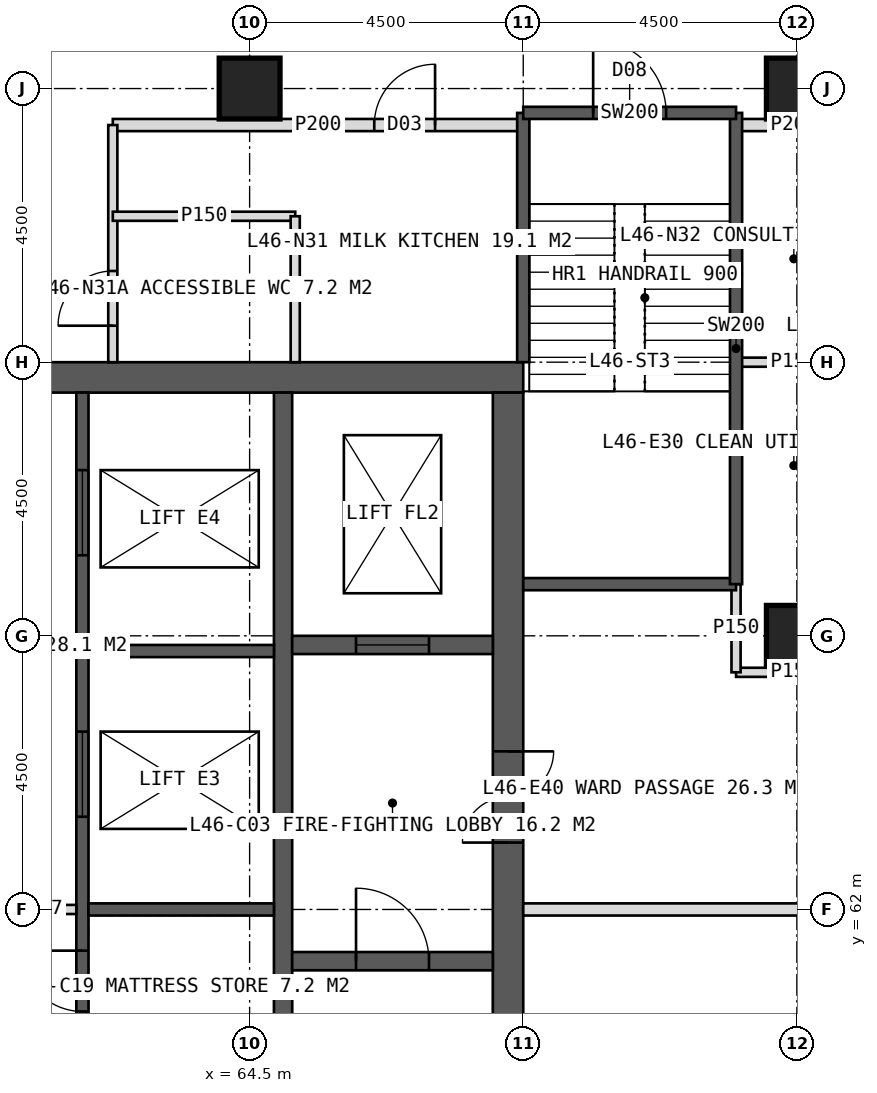
"""IFC4 building model, lengths in metres.
Left out: names, types, materials, properties, quantities, classifications, styles, units other than length and angle.
Written with IfcOpenShell. Run it as: python <this file> out.ifc"""

import sys

from ifc_helpers import new_model, si_unit, direction, frame, frame_2d, origin, origin_2d, place, context, subcontext, project, spatial, rectangle, hollow_rectangle, extrude, element, fill, save


model = new_model("IFC4")
c1 = context("Model", 3, precision=1e-05, world=origin(), true_north=direction((0.0, 1.0)))
c2 = subcontext(c1, "Body", "Model", "MODEL_VIEW")
j1 = project(units=[si_unit("LENGTHUNIT", "METRE"), si_unit("PLANEANGLEUNIT", "RADIAN")], contexts=[c1])
p1 = place(None, origin())
s1 = spatial("IfcSite", under=j1, at=p1, CompositionType="ELEMENT")
p2 = place(p1, origin())
s2 = spatial("IfcBuilding", under=s1, at=p2, CompositionType="ELEMENT")
p3 = place(p2, frame((0.0, 0.0, 193.0)))
s3 = spatial("IfcBuildingStorey", under=s2, at=p3, CompositionType="ELEMENT", Elevation=193.0)
p4 = place(p3, frame((51.0, 70.75, 0.0), z_axis=(0.0, 0.0, 1.0), x_axis=(1.0, 0.0, 0.0)))
e1 = element("IfcWall", 1, at=p4, inside=s3, PredefinedType="SHEAR", context=c2, shape_type="SweptSolid", body=[
    extrude(rectangle(XDim=18.0, YDim=0.5, at=frame_2d((9.0, 0.0))), origin(), (0.0, 0.0, 1.0), 4.0),
])
p5 = place(p4, frame((8.1, 0.0, 0.0)))
e2 = element("IfcOpeningElement", 2, at=p5, cuts=e1, PredefinedType="OPENING", context=c2, shape_type="SweptSolid", body=[
    extrude(rectangle(XDim=1.8, YDim=2.2, at=frame_2d((0.9, 1.1))), frame((0.0, 0.26, 0.0), z_axis=(0.0, -1.0, 0.0), x_axis=(1.0, 0.0, 0.0)), (0.0, 0.0, 1.0), 0.52),
])
p6 = place(p3, frame((68.75, 53.5, 0.0), z_axis=(0.0, 0.0, 1.0), x_axis=(0.0, 1.0, 0.0)))
e3 = element("IfcWall", 3, at=p6, inside=s3, PredefinedType="SHEAR", context=c2, shape_type="SweptSolid", body=[
    extrude(rectangle(XDim=17.0, YDim=0.5, at=frame_2d((8.5, 0.0))), origin(), (0.0, 0.0, 1.0), 4.0),
])
p7 = place(p6, frame((9.6, 0.0, 0.0)))
e4 = element("IfcOpeningElement", 4, at=p7, cuts=e3, PredefinedType="OPENING", context=c2, shape_type="SweptSolid", body=[
    extrude(rectangle(XDim=1.5, YDim=2.2, at=frame_2d((0.75, 1.1))), frame((0.0, 0.26, 0.0), z_axis=(0.0, -1.0, 0.0), x_axis=(1.0, 0.0, 0.0)), (0.0, 0.0, 1.0), 0.52),
])
p8 = place(p3, frame((65.05, 53.5, 0.0), z_axis=(0.0, 0.0, 1.0), x_axis=(0.0, 1.0, 0.0)))
e5 = element("IfcWall", 5, at=p8, inside=s3, PredefinedType="SHEAR", context=c2, shape_type="SweptSolid", body=[
    extrude(rectangle(XDim=17.0, YDim=0.3, at=frame_2d((8.5, 0.0))), origin(), (0.0, 0.0, 1.0), 4.0),
])
p9 = place(p3, frame((61.75, 53.5, 0.0), z_axis=(0.0, 0.0, 1.0), x_axis=(0.0, 1.0, 0.0)))
e6 = element("IfcWall", 6, at=p9, inside=s3, PredefinedType="SHEAR", context=c2, shape_type="SweptSolid", body=[
    extrude(rectangle(XDim=17.0, YDim=0.2, at=frame_2d((8.5, 0.0))), origin(), (0.0, 0.0, 1.0), 4.0),
])
p10 = place(p9, frame((0.808, 0.0, 0.0)))
e7 = element("IfcOpeningElement", 7, at=p10, cuts=e6, PredefinedType="OPENING", context=c2, shape_type="SweptSolid", body=[
    extrude(rectangle(XDim=1.0, YDim=2.1, at=frame_2d((0.5, 1.05))), frame((0.0, 0.11, 0.0), z_axis=(0.0, -1.0, 0.0), x_axis=(1.0, 0.0, 0.0)), (0.0, 0.0, 1.0), 0.22),
])
p11 = place(p9, frame((2.958, 0.0, 0.0)))
e8 = element("IfcOpeningElement", 8, at=p11, cuts=e6, PredefinedType="OPENING", context=c2, shape_type="SweptSolid", body=[
    extrude(rectangle(XDim=1.0, YDim=2.1, at=frame_2d((0.5, 1.05))), frame((0.0, 0.11, 0.0), z_axis=(0.0, -1.0, 0.0), x_axis=(1.0, 0.0, 0.0)), (0.0, 0.0, 1.0), 0.22),
])
p12 = place(p9, frame((4.722, 0.0, 0.0)))
e9 = element("IfcOpeningElement", 9, at=p12, cuts=e6, PredefinedType="OPENING", context=c2, shape_type="SweptSolid", body=[
    extrude(rectangle(XDim=1.0, YDim=2.1, at=frame_2d((0.5, 1.05))), frame((0.0, 0.11, 0.0), z_axis=(0.0, -1.0, 0.0), x_axis=(1.0, 0.0, 0.0)), (0.0, 0.0, 1.0), 0.22),
])
p13 = place(p9, frame((6.823, 0.0, 0.0)))
e10 = element("IfcOpeningElement", 10, at=p13, cuts=e6, PredefinedType="OPENING", context=c2, shape_type="SweptSolid", body=[
    extrude(rectangle(XDim=1.0, YDim=2.1, at=frame_2d((0.5, 1.05))), frame((0.0, 0.11, 0.0), z_axis=(0.0, -1.0, 0.0), x_axis=(1.0, 0.0, 0.0)), (0.0, 0.0, 1.0), 0.22),
])
p14 = place(p9, frame((10.025, 0.0, 0.0)))
e11 = element("IfcOpeningElement", 11, at=p14, cuts=e6, PredefinedType="OPENING", context=c2, shape_type="SweptSolid", body=[
    extrude(rectangle(XDim=1.4, YDim=2.2, at=frame_2d((0.7, 1.1))), frame((0.0, 0.11, 0.0), z_axis=(0.0, -1.0, 0.0), x_axis=(1.0, 0.0, 0.0)), (0.0, 0.0, 1.0), 0.22),
])
p15 = place(p9, frame((14.325, 0.0, 0.0)))
e12 = element("IfcOpeningElement", 12, at=p15, cuts=e6, PredefinedType="OPENING", context=c2, shape_type="SweptSolid", body=[
    extrude(rectangle(XDim=1.4, YDim=2.2, at=frame_2d((0.7, 1.1))), frame((0.0, 0.11, 0.0), z_axis=(0.0, -1.0, 0.0), x_axis=(1.0, 0.0, 0.0)), (0.0, 0.0, 1.0), 0.22),
])
for number, where, z_axis, x_axis in (
    (13, (61.85, 62.0, 0.0), (0.0, 0.0, 1.0), (1.0, 0.0, 0.0)),
    (14, (61.85, 66.25, 0.0), (0.0, 0.0, 1.0), (1.0, 0.0, 0.0)),
):
    element("IfcWall", number, at=place(p3, frame(where, z_axis=z_axis, x_axis=x_axis)), inside=s3, PredefinedType="SHEAR", context=c2, shape_type="SweptSolid", body=[
        extrude(rectangle(XDim=3.05, YDim=0.2, at=frame_2d((1.525, 0.0))), origin(), (0.0, 0.0, 1.0), 4.0),
    ])
p16 = place(p3, frame((65.2, 61.15, 0.0), z_axis=(0.0, 0.0, 1.0), x_axis=(1.0, 0.0, 0.0)))
e15 = element("IfcWall", 15, at=p16, inside=s3, PredefinedType="SHEAR", context=c2, shape_type="SweptSolid", body=[
    extrude(rectangle(XDim=3.3, YDim=0.3, at=frame_2d((1.65, 0.0))), origin(), (0.0, 0.0, 1.0), 4.0),
])
p17 = place(p16, frame((1.05, 0.0, 0.0)))
e16 = element("IfcOpeningElement", 16, at=p17, cuts=e15, PredefinedType="OPENING", context=c2, shape_type="SweptSolid", body=[
    extrude(rectangle(XDim=1.2, YDim=2.1, at=frame_2d((0.6, 1.05))), frame((0.0, 0.16, 0.0), z_axis=(0.0, -1.0, 0.0), x_axis=(1.0, 0.0, 0.0)), (0.0, 0.0, 1.0), 0.32),
])
p18 = place(p3, frame((65.2, 66.35, 0.0), z_axis=(0.0, 0.0, 1.0), x_axis=(1.0, 0.0, 0.0)))
e17 = element("IfcWall", 17, at=p18, inside=s3, PredefinedType="SHEAR", context=c2, shape_type="SweptSolid", body=[
    extrude(rectangle(XDim=3.3, YDim=0.3, at=frame_2d((1.65, 0.0))), origin(), (0.0, 0.0, 1.0), 4.0),
])
p19 = place(p18, frame((1.05, 0.0, 0.0)))
e18 = element("IfcOpeningElement", 18, at=p19, cuts=e17, PredefinedType="OPENING", context=c2, shape_type="SweptSolid", body=[
    extrude(rectangle(XDim=1.2, YDim=2.2, at=frame_2d((0.6, 1.1))), frame((0.0, 0.16, 0.0), z_axis=(0.0, -1.0, 0.0), x_axis=(1.0, 0.0, 0.0)), (0.0, 0.0, 1.0), 0.32),
])
for number, where, z_axis, x_axis in (
    (19, (73.5, 75.5, 0.0), (0.0, 0.0, 1.0), (1.0, 0.0, 0.0)),
    (20, (64.5, 75.5, 0.0), (0.0, 0.0, 1.0), (1.0, 0.0, 0.0)),
    (21, (73.5, 66.5, 0.0), (0.0, 0.0, 1.0), (1.0, 0.0, 0.0)),
):
    element("IfcColumn", number, at=place(p3, frame(where, z_axis=z_axis, x_axis=x_axis)), inside=s3, PredefinedType="COLUMN", context=c2, shape_type="SweptSolid", body=[
        extrude(hollow_rectangle(XDim=1.0, YDim=1.0, WallThickness=0.1, at=origin_2d()), origin(), (0.0, 0.0, 1.0), 4.0),
    ])
p20 = place(p3, frame((62.25, 74.9, 0.0), z_axis=(0.0, 0.0, 1.0), x_axis=(1.0, 0.0, 0.0)))
e22 = element("IfcWall", 22, at=p20, inside=s3, PredefinedType="PARTITIONING", context=c2, shape_type="SweptSolid", body=[
    extrude(rectangle(XDim=6.75, YDim=0.2, at=frame_2d((3.375, 0.0))), origin(), (0.0, 0.0, 1.0), 3.75),
])
p21 = place(p20, frame((4.3, 0.0, 0.0)))
e23 = element("IfcOpeningElement", 23, at=p21, cuts=e22, PredefinedType="OPENING", context=c2, shape_type="SweptSolid", body=[
    extrude(rectangle(XDim=1.0, YDim=2.1, at=frame_2d((0.5, 1.05))), frame((0.0, 0.11, 0.0), z_axis=(0.0, -1.0, 0.0), x_axis=(1.0, 0.0, 0.0)), (0.0, 0.0, 1.0), 0.22),
])
p22 = place(p3, frame((72.5, 74.9, 0.0), z_axis=(0.0, 0.0, 1.0), x_axis=(1.0, 0.0, 0.0)))
e24 = element("IfcWall", 24, at=p22, inside=s3, PredefinedType="PARTITIONING", context=c2, shape_type="SweptSolid", body=[
    extrude(rectangle(XDim=1.9, YDim=0.2, at=frame_2d((0.95, 0.0))), origin(), (0.0, 0.0, 1.0), 3.75),
])
p23 = place(p3, frame((62.25, 71.0, 0.0), z_axis=(0.0, 0.0, 1.0), x_axis=(0.0, 1.0, 0.0)))
e25 = element("IfcWall", 25, at=p23, inside=s3, PredefinedType="PARTITIONING", context=c2, shape_type="SweptSolid", body=[
    extrude(rectangle(XDim=3.9, YDim=0.15, at=frame_2d((1.95, 0.0))), origin(), (0.0, 0.0, 1.0), 3.75),
])
p24 = place(p23, frame((0.6, 0.0, 0.0)))
e26 = element("IfcOpeningElement", 26, at=p24, cuts=e25, PredefinedType="OPENING", context=c2, shape_type="SweptSolid", body=[
    extrude(rectangle(XDim=0.9, YDim=2.1, at=frame_2d((0.45, 1.05))), frame((0.0, 0.085, 0.0), z_axis=(0.0, -1.0, 0.0), x_axis=(1.0, 0.0, 0.0)), (0.0, 0.0, 1.0), 0.17),
])
p25 = place(p3, frame((62.25, 73.4, 0.0), z_axis=(0.0, 0.0, 1.0), x_axis=(1.0, 0.0, 0.0)))
e27 = element("IfcWall", 27, at=p25, inside=s3, PredefinedType="PARTITIONING", context=c2, shape_type="SweptSolid", body=[
    extrude(rectangle(XDim=3.0, YDim=0.15, at=frame_2d((1.5, 0.0))), origin(), (0.0, 0.0, 1.0), 3.75),
])
p26 = place(p3, frame((65.25, 71.0, 0.0), z_axis=(0.0, 0.0, 1.0), x_axis=(0.0, 1.0, 0.0)))
e28 = element("IfcWall", 28, at=p26, inside=s3, PredefinedType="PARTITIONING", context=c2, shape_type="SweptSolid", body=[
    extrude(rectangle(XDim=2.4, YDim=0.15, at=frame_2d((1.2, 0.0))), origin(), (0.0, 0.0, 1.0), 3.75),
])
for number, where, z_axis, x_axis in (
    (29, (72.5, 71.0, 0.0), (0.0, 0.0, 1.0), (1.0, 0.0, 0.0)),
    (30, (72.5, 65.9, 0.0), (0.0, 0.0, 1.0), (1.0, 0.0, 0.0)),
):
    element("IfcWall", number, at=place(p3, frame(where, z_axis=z_axis, x_axis=x_axis)), inside=s3, PredefinedType="PARTITIONING", context=c2, shape_type="SweptSolid", body=[
        extrude(rectangle(XDim=1.9, YDim=0.15, at=frame_2d((0.95, 0.0))), origin(), (0.0, 0.0, 1.0), 3.75),
    ])
p27 = place(p3, frame((69.0, 62.0, 0.0), z_axis=(0.0, 0.0, 1.0), x_axis=(1.0, 0.0, 0.0)))
e31 = element("IfcWall", 31, at=p27, inside=s3, PredefinedType="SOLIDWALL", context=c2, shape_type="SweptSolid", body=[
    extrude(rectangle(XDim=5.4, YDim=0.2, at=frame_2d((2.7, 0.0))), origin(), (0.0, 0.0, 1.0), 2.95),
])
p28 = place(p3, frame((58.35, 62.0, 0.0), z_axis=(0.0, 0.0, 1.0), x_axis=(1.0, 0.0, 0.0)))
e32 = element("IfcWall", 32, at=p28, inside=s3, PredefinedType="PARTITIONING", context=c2, shape_type="SweptSolid", body=[
    extrude(rectangle(XDim=3.3, YDim=0.15, at=frame_2d((1.65, 0.0))), origin(), (0.0, 0.0, 1.0), 3.75),
])
p29 = place(p3, frame((72.5, 65.9, 0.0), z_axis=(0.0, 0.0, 1.0), x_axis=(0.0, 1.0, 0.0)))
e33 = element("IfcWall", 33, at=p29, inside=s3, PredefinedType="PARTITIONING", context=c2, shape_type="SweptSolid", body=[
    extrude(rectangle(XDim=1.45, YDim=0.15, at=frame_2d((0.725, 0.0))), origin(), (0.0, 0.0, 1.0), 3.75),
])
p30 = place(p3, frame((69.0, 71.0, 0.0), z_axis=(0.0, 0.0, 1.0), x_axis=(0.0, 1.0, 0.0)))
e34 = element("IfcWall", 34, at=p30, inside=s3, PredefinedType="SOLIDWALL", context=c2, shape_type="SweptSolid", body=[
    extrude(rectangle(XDim=4.1, YDim=0.2, at=frame_2d((2.05, 0.0))), origin(), (0.0, 0.0, 1.0), 3.75),
])
p31 = place(p3, frame((69.0, 67.35, 0.0), z_axis=(0.0, 0.0, 1.0), x_axis=(1.0, 0.0, 0.0)))
e35 = element("IfcWall", 35, at=p31, inside=s3, PredefinedType="SOLIDWALL", context=c2, shape_type="SweptSolid", body=[
    extrude(rectangle(XDim=3.5, YDim=0.2, at=frame_2d((1.75, 0.0))), origin(), (0.0, 0.0, 1.0), 3.75),
])
p32 = place(p3, frame((72.5, 67.35, 0.0), z_axis=(0.0, 0.0, 1.0), x_axis=(0.0, 1.0, 0.0)))
e36 = element("IfcWall", 36, at=p32, inside=s3, PredefinedType="SOLIDWALL", context=c2, shape_type="SweptSolid", body=[
    extrude(rectangle(XDim=7.75, YDim=0.2, at=frame_2d((3.875, 0.0))), origin(), (0.0, 0.0, 1.0), 3.75),
])
p33 = place(p3, frame((69.0, 75.1, 0.0), z_axis=(0.0, 0.0, 1.0), x_axis=(1.0, 0.0, 0.0)))
e37 = element("IfcWall", 37, at=p33, inside=s3, PredefinedType="SOLIDWALL", context=c2, shape_type="SweptSolid", body=[
    extrude(rectangle(XDim=3.5, YDim=0.2, at=frame_2d((1.75, 0.0))), origin(), (0.0, 0.0, 1.0), 3.75),
])
p34 = place(p33, frame((1.15, 0.0, 0.0)))
e38 = element("IfcOpeningElement", 38, at=p34, cuts=e37, PredefinedType="OPENING", context=c2, shape_type="SweptSolid", body=[
    extrude(rectangle(XDim=1.2, YDim=2.1, at=frame_2d((0.6, 1.05))), frame((0.0, 0.11, 0.0), z_axis=(0.0, -1.0, 0.0), x_axis=(1.0, 0.0, 0.0)), (0.0, 0.0, 1.0), 0.22),
])
p35 = place(p24, origin())
e39 = element("IfcDoor", 39, at=p35, inside=s3, OperationType="SINGLE_SWING_LEFT", PredefinedType="DOOR", context=c2, shape_type="SweptSolid", body=[
    extrude(rectangle(XDim=0.9, YDim=2.1, at=frame_2d((0.45, 1.05))), frame((0.0, 0.025, 0.0), z_axis=(0.0, -1.0, 0.0), x_axis=(1.0, 0.0, 0.0)), (0.0, 0.0, 1.0), 0.05),
])
fill(e26, e39)
p36 = place(p21, origin())
e40 = element("IfcDoor", 40, at=p36, inside=s3, OperationType="SINGLE_SWING_RIGHT", PredefinedType="DOOR", context=c2, shape_type="SweptSolid", body=[
    extrude(rectangle(XDim=1.0, YDim=2.1, at=frame_2d((0.5, 1.05))), frame((0.0, 0.025, 0.0), z_axis=(0.0, -1.0, 0.0), x_axis=(1.0, 0.0, 0.0)), (0.0, 0.0, 1.0), 0.05),
])
fill(e23, e40)
p37 = place(p7, origin())
e41 = element("IfcDoor", 41, at=p37, inside=s3, OperationType="DOUBLE_DOOR_SINGLE_SWING", PredefinedType="DOOR", context=c2, shape_type="SweptSolid", body=[
    extrude(rectangle(XDim=1.5, YDim=2.2, at=frame_2d((0.75, 1.1))), frame((0.0, 0.025, 0.0), z_axis=(0.0, -1.0, 0.0), x_axis=(1.0, 0.0, 0.0)), (0.0, 0.0, 1.0), 0.05),
])
fill(e4, e41)
p38 = place(p17, origin())
e42 = element("IfcDoor", 42, at=p38, inside=s3, OperationType="SINGLE_SWING_LEFT", PredefinedType="DOOR", context=c2, shape_type="SweptSolid", body=[
    extrude(rectangle(XDim=1.2, YDim=2.1, at=frame_2d((0.6, 1.05))), frame((0.0, 0.025, 0.0), z_axis=(0.0, -1.0, 0.0), x_axis=(1.0, 0.0, 0.0)), (0.0, 0.0, 1.0), 0.05),
])
fill(e16, e42)
p39 = place(p19, origin())
e43 = element("IfcDoor", 43, at=p39, inside=s3, OperationType="SLIDING_TO_LEFT", PredefinedType="DOOR", context=c2, shape_type="SweptSolid", body=[
    extrude(rectangle(XDim=1.2, YDim=2.2, at=frame_2d((0.6, 1.1))), frame((0.0, 0.025, 0.0), z_axis=(0.0, -1.0, 0.0), x_axis=(1.0, 0.0, 0.0)), (0.0, 0.0, 1.0), 0.05),
])
fill(e18, e43)
p40 = place(p13, origin())
e44 = element("IfcDoor", 44, at=p40, inside=s3, OperationType="SINGLE_SWING_RIGHT", PredefinedType="DOOR", context=c2, shape_type="SweptSolid", body=[
    extrude(rectangle(XDim=1.0, YDim=2.1, at=frame_2d((0.5, 1.05))), frame((0.0, 0.025, 0.0), z_axis=(0.0, -1.0, 0.0), x_axis=(1.0, 0.0, 0.0)), (0.0, 0.0, 1.0), 0.05),
])
fill(e10, e44)
p41 = place(p14, origin())
e45 = element("IfcDoor", 45, at=p41, inside=s3, OperationType="SLIDING_TO_LEFT", PredefinedType="DOOR", context=c2, shape_type="SweptSolid", body=[
    extrude(rectangle(XDim=1.4, YDim=2.2, at=frame_2d((0.7, 1.1))), frame((0.0, 0.025, 0.0), z_axis=(0.0, -1.0, 0.0), x_axis=(1.0, 0.0, 0.0)), (0.0, 0.0, 1.0), 0.05),
])
fill(e11, e45)
p42 = place(p15, origin())
e46 = element("IfcDoor", 46, at=p42, inside=s3, OperationType="SLIDING_TO_LEFT", PredefinedType="DOOR", context=c2, shape_type="SweptSolid", body=[
    extrude(rectangle(XDim=1.4, YDim=2.2, at=frame_2d((0.7, 1.1))), frame((0.0, 0.025, 0.0), z_axis=(0.0, -1.0, 0.0), x_axis=(1.0, 0.0, 0.0)), (0.0, 0.0, 1.0), 0.05),
])
fill(e12, e46)
p43 = place(p34, origin())
e47 = element("IfcDoor", 47, at=p43, inside=s3, OperationType="SINGLE_SWING_LEFT", PredefinedType="DOOR", context=c2, shape_type="SweptSolid", body=[
    extrude(rectangle(XDim=1.2, YDim=2.1, at=frame_2d((0.6, 1.05))), frame((0.0, 0.025, 0.0), z_axis=(0.0, -1.0, 0.0), x_axis=(1.0, 0.0, 0.0)), (0.0, 0.0, 1.0), 0.05),
])
fill(e38, e47)
save(model, sys.argv[1])
